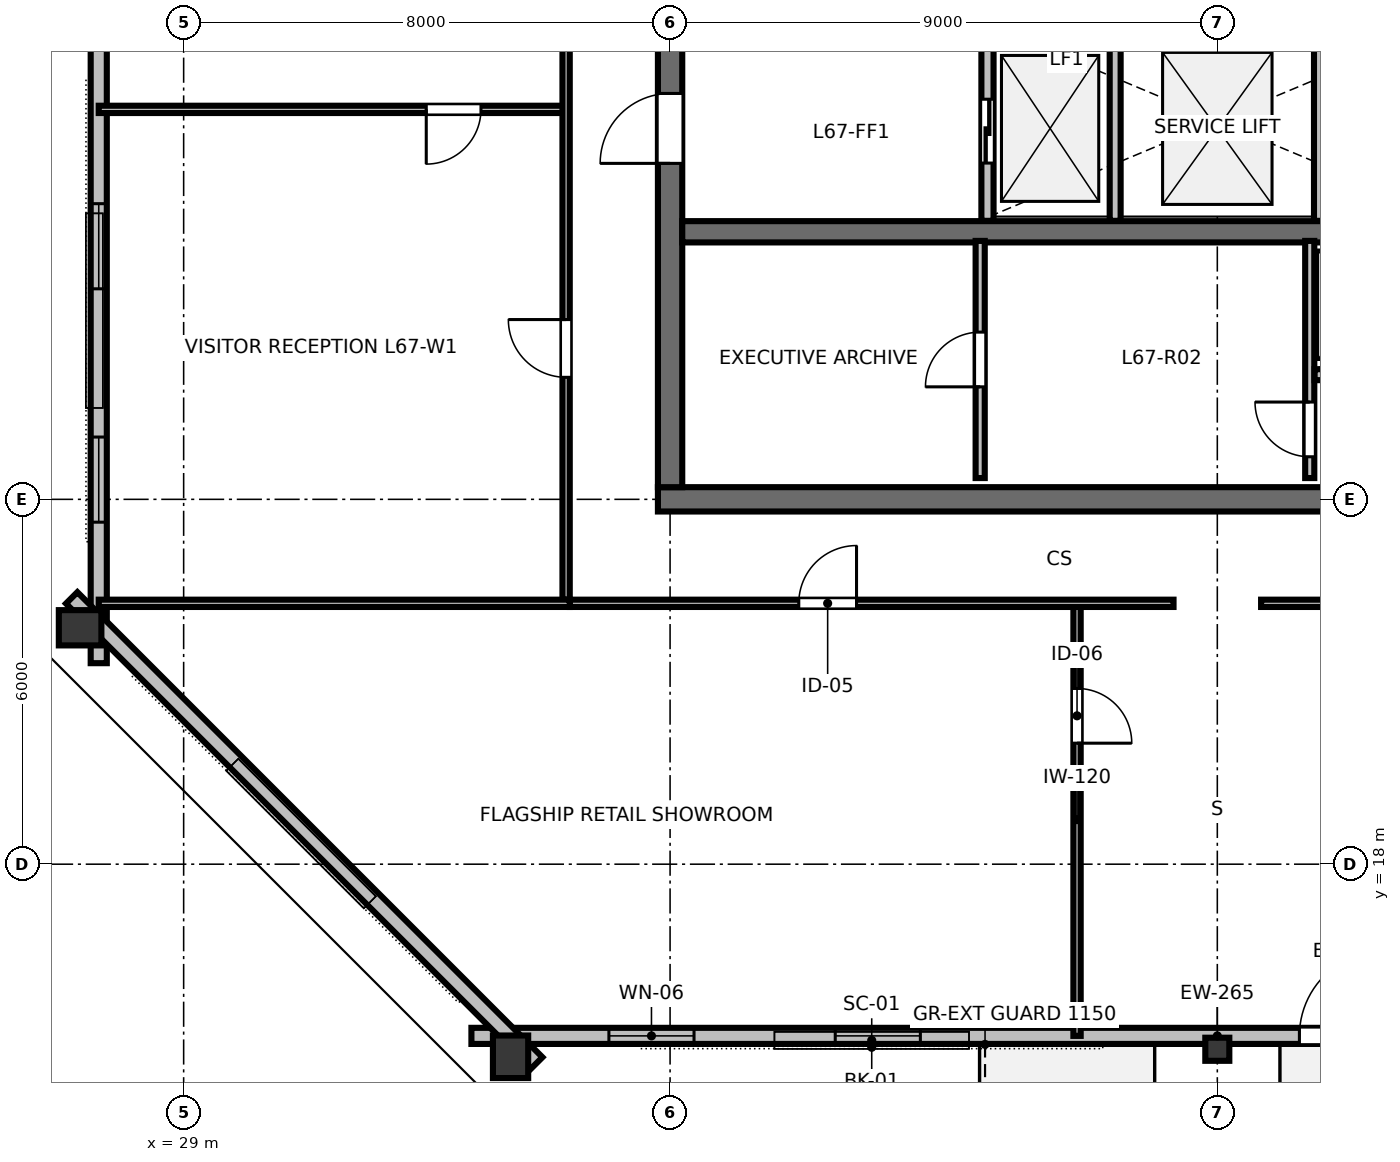
"""IFC4 building model, lengths in metres.
Left out: names, types, materials, properties, quantities, classifications, styles, units other than length and angle.
Written with IfcOpenShell. Run it as: python <this file> out.ifc"""

import sys

from ifc_helpers import new_model, si_unit, direction, frame, frame_2d, origin, origin_2d, place, context, subcontext, project, spatial, rectangle, hollow_rectangle, i_section, extrude, element, fill, save


model = new_model("IFC4")
c1 = context("Model", 3, precision=1e-05, world=origin(), true_north=direction((0.0, 1.0)))
c2 = subcontext(c1, "Body", "Model", "MODEL_VIEW")
j1 = project(units=[si_unit("LENGTHUNIT", "METRE"), si_unit("PLANEANGLEUNIT", "RADIAN")], contexts=[c1])
p1 = place(None, origin())
s1 = spatial("IfcSite", under=j1, at=p1, CompositionType="ELEMENT")
p2 = place(p1, origin())
s2 = spatial("IfcBuilding", under=s1, at=p2, CompositionType="ELEMENT")
p3 = place(p2, frame((0.0, 0.0, 253.8)))
s3 = spatial("IfcBuildingStorey", under=s2, at=p3, CompositionType="ELEMENT", Elevation=253.8)
p4 = place(p3, frame((36.8, 24.0, 0.0), z_axis=(0.0, 0.0, 1.0), x_axis=(1.0, 0.0, 0.0)))
e1 = element("IfcWall", 1, at=p4, inside=s3, PredefinedType="SHEAR", context=c2, shape_type="SweptSolid", body=[
    extrude(rectangle(XDim=18.4, YDim=0.4, at=frame_2d((9.2, 0.0))), origin(), (0.0, 0.0, 1.0), 3.36),
])
p5 = place(p4, frame((13.4, 0.0, 0.0)))
e2 = element("IfcOpeningElement", 2, at=p5, cuts=e1, PredefinedType="OPENING", context=c2, shape_type="SweptSolid", body=[
    extrude(rectangle(XDim=1.6, YDim=2.15, at=frame_2d((0.8, 1.075))), frame((0.0, 0.21, 0.0), z_axis=(0.0, -1.0, 0.0), x_axis=(1.0, 0.0, 0.0)), (0.0, 0.0, 1.0), 0.42),
])
p6 = place(p3, frame((37.0, 24.2, 0.0), z_axis=(0.0, 0.0, 1.0), x_axis=(0.0, 1.0, 0.0)))
e3 = element("IfcWall", 3, at=p6, inside=s3, PredefinedType="SHEAR", context=c2, shape_type="SweptSolid", body=[
    extrude(rectangle(XDim=15.6, YDim=0.4, at=frame_2d((7.8, 0.0))), origin(), (0.0, 0.0, 1.0), 3.36),
])
p7 = place(p6, frame((5.325, 0.0, 0.0)))
e4 = element("IfcOpeningElement", 4, at=p7, cuts=e3, PredefinedType="OPENING", context=c2, shape_type="SweptSolid", body=[
    extrude(rectangle(XDim=1.15, YDim=2.15, at=frame_2d((0.575, 1.075))), frame((0.0, 0.21, 0.0), z_axis=(0.0, -1.0, 0.0), x_axis=(1.0, 0.0, 0.0)), (0.0, 0.0, 1.0), 0.42),
])
p8 = place(p3, frame((37.2, 28.4, 0.0), z_axis=(0.0, 0.0, 1.0), x_axis=(1.0, 0.0, 0.0)))
e5 = element("IfcWall", 5, at=p8, inside=s3, PredefinedType="SHEAR", context=c2, shape_type="SweptSolid", body=[
    extrude(rectangle(XDim=17.6, YDim=0.35, at=frame_2d((8.8, 0.0))), origin(), (0.0, 0.0, 1.0), 3.36),
])
p9 = place(p3, frame((34.376, 14.833, 0.0), z_axis=(0.0, 0.0, 1.0), x_axis=(1.0, 0.0, 0.0)))
e6 = element("IfcColumn", 6, at=p9, inside=s3, PredefinedType="COLUMN", context=c2, shape_type="SweptSolid", body=[
    extrude(hollow_rectangle(XDim=0.58, YDim=0.7, WallThickness=0.032, at=origin_2d()), origin(), (0.0, 0.0, 1.0), 3.373),
])
p10 = place(p3, frame((46.0, 14.956, 0.0), z_axis=(0.0, 0.0, 1.0), x_axis=(1.0, 0.0, 0.0)))
e7 = element("IfcColumn", 7, at=p10, inside=s3, PredefinedType="COLUMN", context=c2, shape_type="SweptSolid", body=[
    extrude(i_section(OverallWidth=0.395, OverallDepth=0.38, WebThickness=0.019, FlangeThickness=0.03, FilletRadius=0.025, at=origin_2d()), origin(), (0.0, 0.0, 1.0), 3.373),
])
p11 = place(p3, frame((27.297, 21.888, 0.0), z_axis=(0.0, 0.0, 1.0), x_axis=(0.0, 1.0, 0.0)))
e8 = element("IfcColumn", 8, at=p11, inside=s3, PredefinedType="COLUMN", context=c2, shape_type="SweptSolid", body=[
    extrude(hollow_rectangle(XDim=0.58, YDim=0.7, WallThickness=0.032, at=origin_2d()), origin(), (0.0, 0.0, 1.0), 3.373),
])
p12 = place(p3, frame((33.733, 15.177, 0.0), z_axis=(0.0, 0.0, 1.0), x_axis=(1.0, 0.0, 0.0)))
e9 = element("IfcWall", 9, at=p12, inside=s3, PredefinedType="STANDARD", context=c2, shape_type="SweptSolid", body=[
    extrude(rectangle(XDim=24.535, YDim=0.265, at=frame_2d((12.267, 0.0))), origin(), (0.0, 0.0, 1.0), 2.832),
])
p13 = place(p12, frame((13.617, 0.0, 0.0)))
e10 = element("IfcOpeningElement", 10, at=p13, cuts=e9, PredefinedType="OPENING", context=c2, shape_type="SweptSolid", body=[
    extrude(rectangle(XDim=1.4, YDim=2.15, at=frame_2d((0.7, 1.075))), frame((0.0, 0.142, 0.0), z_axis=(0.0, -1.0, 0.0), x_axis=(1.0, 0.0, 0.0)), (0.0, 0.0, 1.0), 0.285),
])
p14 = place(p12, frame((2.261, 0.0, 0.85)))
e11 = element("IfcOpeningElement", 11, at=p14, cuts=e9, PredefinedType="OPENING", context=c2, shape_type="SweptSolid", body=[
    extrude(rectangle(XDim=1.4, YDim=1.2, at=frame_2d((0.7, 0.6))), frame((0.0, 0.142, 0.0), z_axis=(0.0, -1.0, 0.0), x_axis=(1.0, 0.0, 0.0)), (0.0, 0.0, 1.0), 0.285),
])
p15 = place(p12, frame((5.984, 0.0, 0.85)))
e12 = element("IfcOpeningElement", 12, at=p15, cuts=e9, PredefinedType="OPENING", context=c2, shape_type="SweptSolid", body=[
    extrude(rectangle(XDim=1.4, YDim=1.2, at=frame_2d((0.7, 0.6))), frame((0.0, 0.142, 0.0), z_axis=(0.0, -1.0, 0.0), x_axis=(1.0, 0.0, 0.0)), (0.0, 0.0, 1.0), 0.285),
])
p16 = place(p12, frame((17.151, 0.0, 0.85)))
e13 = element("IfcOpeningElement", 13, at=p16, cuts=e9, PredefinedType="OPENING", context=c2, shape_type="SweptSolid", body=[
    extrude(rectangle(XDim=1.4, YDim=1.2, at=frame_2d((0.7, 0.6))), frame((0.0, 0.142, 0.0), z_axis=(0.0, -1.0, 0.0), x_axis=(1.0, 0.0, 0.0)), (0.0, 0.0, 1.0), 0.285),
])
p17 = place(p12, frame((20.873, 0.0, 0.85)))
e14 = element("IfcOpeningElement", 14, at=p17, cuts=e9, PredefinedType="OPENING", context=c2, shape_type="SweptSolid", body=[
    extrude(rectangle(XDim=1.4, YDim=1.2, at=frame_2d((0.7, 0.6))), frame((0.0, 0.142, 0.0), z_axis=(0.0, -1.0, 0.0), x_axis=(1.0, 0.0, 0.0)), (0.0, 0.0, 1.0), 0.285),
])
p18 = place(p3, frame((27.604, 42.695, 0.0), z_axis=(0.0, 0.0, 1.0), x_axis=(0.0, -1.0, 0.0)))
e15 = element("IfcWall", 15, at=p18, inside=s3, PredefinedType="STANDARD", context=c2, shape_type="SweptSolid", body=[
    extrude(rectangle(XDim=21.389, YDim=0.265, at=frame_2d((10.695, 0.0))), origin(), (0.0, 0.0, 1.0), 2.832),
])
p19 = place(p18, frame((2.319, 0.0, 0.85)))
e16 = element("IfcOpeningElement", 16, at=p19, cuts=e15, PredefinedType="OPENING", context=c2, shape_type="SweptSolid", body=[
    extrude(rectangle(XDim=1.4, YDim=1.2, at=frame_2d((0.7, 0.6))), frame((0.0, 0.142, 0.0), z_axis=(0.0, -1.0, 0.0), x_axis=(1.0, 0.0, 0.0)), (0.0, 0.0, 1.0), 0.285),
])
p20 = place(p18, frame((6.157, 0.0, 0.85)))
e17 = element("IfcOpeningElement", 17, at=p20, cuts=e15, PredefinedType="OPENING", context=c2, shape_type="SweptSolid", body=[
    extrude(rectangle(XDim=1.4, YDim=1.2, at=frame_2d((0.7, 0.6))), frame((0.0, 0.142, 0.0), z_axis=(0.0, -1.0, 0.0), x_axis=(1.0, 0.0, 0.0)), (0.0, 0.0, 1.0), 0.285),
])
p21 = place(p18, frame((13.832, 0.0, 0.85)))
e18 = element("IfcOpeningElement", 18, at=p21, cuts=e15, PredefinedType="OPENING", context=c2, shape_type="SweptSolid", body=[
    extrude(rectangle(XDim=1.4, YDim=1.2, at=frame_2d((0.7, 0.6))), frame((0.0, 0.142, 0.0), z_axis=(0.0, -1.0, 0.0), x_axis=(1.0, 0.0, 0.0)), (0.0, 0.0, 1.0), 0.285),
])
p22 = place(p18, frame((17.67, 0.0, 0.85)))
e19 = element("IfcOpeningElement", 19, at=p22, cuts=e15, PredefinedType="OPENING", context=c2, shape_type="SweptSolid", body=[
    extrude(rectangle(XDim=1.4, YDim=1.2, at=frame_2d((0.7, 0.6))), frame((0.0, 0.142, 0.0), z_axis=(0.0, -1.0, 0.0), x_axis=(1.0, 0.0, 0.0)), (0.0, 0.0, 1.0), 0.285),
])
p23 = place(p3, frame((27.159, 22.38, 0.0), z_axis=(0.0, 0.0, 1.0), x_axis=(0.707106781187, -0.707106781187, 0.0)))
e20 = element("IfcWall", 20, at=p23, inside=s3, PredefinedType="STANDARD", context=c2, shape_type="SweptSolid", body=[
    extrude(rectangle(XDim=10.816, YDim=0.265, at=frame_2d((5.408, 0.0))), origin(), (0.0, 0.0, 1.0), 2.832),
])
p24 = place(p3, frame((42.22, 28.58, 0.0), z_axis=(0.0, 0.0, 1.0), x_axis=(0.0, 1.0, 0.0)))
e21 = element("IfcWall", 21, at=p24, inside=s3, PredefinedType="PARTITIONING", context=c2, shape_type="SweptSolid", body=[
    extrude(rectangle(XDim=3.04, YDim=0.2, at=frame_2d((1.52, 0.0))), origin(), (0.0, 0.0, 1.0), 3.375),
])
p25 = place(p24, frame((0.95, 0.0, 0.0)))
e22 = element("IfcOpeningElement", 22, at=p25, cuts=e21, PredefinedType="OPENING", context=c2, shape_type="SweptSolid", body=[
    extrude(rectangle(XDim=1.05, YDim=2.15, at=frame_2d((0.525, 1.075))), frame((0.0, 0.11, 0.0), z_axis=(0.0, -1.0, 0.0), x_axis=(1.0, 0.0, 0.0)), (0.0, 0.0, 1.0), 0.22),
])
for number, where, z_axis, x_axis in (
    (23, (44.32, 28.58, 0.0), (0.0, 0.0, 1.0), (0.0, 1.0, 0.0)),
    (24, (47.68, 28.58, 0.0), (0.0, 0.0, 1.0), (0.0, 1.0, 0.0)),
):
    element("IfcWall", number, at=place(p3, frame(where, z_axis=z_axis, x_axis=x_axis)), inside=s3, PredefinedType="PARTITIONING", context=c2, shape_type="SweptSolid", body=[
        extrude(rectangle(XDim=3.04, YDim=0.18, at=frame_2d((1.52, 0.0))), origin(), (0.0, 0.0, 1.0), 3.375),
    ])
p26 = place(p3, frame((42.1, 24.35, 0.0), z_axis=(0.0, 0.0, 1.0), x_axis=(0.0, 1.0, 0.0)))
e25 = element("IfcWall", 25, at=p26, inside=s3, PredefinedType="PARTITIONING", context=c2, shape_type="SweptSolid", body=[
    extrude(rectangle(XDim=3.9, YDim=0.15, at=frame_2d((1.95, 0.0))), origin(), (0.0, 0.0, 1.0), 3.375),
])
p27 = place(p26, frame((1.5, 0.0, 0.0)))
e26 = element("IfcOpeningElement", 26, at=p27, cuts=e25, PredefinedType="OPENING", context=c2, shape_type="SweptSolid", body=[
    extrude(rectangle(XDim=0.9, YDim=2.15, at=frame_2d((0.45, 1.075))), frame((0.0, 0.085, 0.0), z_axis=(0.0, -1.0, 0.0), x_axis=(1.0, 0.0, 0.0)), (0.0, 0.0, 1.0), 0.17),
])
p28 = place(p3, frame((47.52, 24.35, 0.0), z_axis=(0.0, 0.0, 1.0), x_axis=(0.0, 1.0, 0.0)))
e27 = element("IfcWall", 27, at=p28, inside=s3, PredefinedType="PARTITIONING", context=c2, shape_type="SweptSolid", body=[
    extrude(rectangle(XDim=3.9, YDim=0.15, at=frame_2d((1.95, 0.0))), origin(), (0.0, 0.0, 1.0), 3.375),
])
p29 = place(p28, frame((0.35, 0.0, 0.0)))
e28 = element("IfcOpeningElement", 28, at=p29, cuts=e27, PredefinedType="OPENING", context=c2, shape_type="SweptSolid", body=[
    extrude(rectangle(XDim=0.9, YDim=2.15, at=frame_2d((0.45, 1.075))), frame((0.0, 0.085, 0.0), z_axis=(0.0, -1.0, 0.0), x_axis=(1.0, 0.0, 0.0)), (0.0, 0.0, 1.0), 0.17),
])
p30 = place(p3, frame((47.6, 26.05, 0.0), z_axis=(0.0, 0.0, 1.0), x_axis=(1.0, 0.0, 0.0)))
e29 = element("IfcWall", 29, at=p30, inside=s3, PredefinedType="PARTITIONING", context=c2, shape_type="SweptSolid", body=[
    extrude(rectangle(XDim=7.0, YDim=0.18, at=frame_2d((3.5, 0.0))), origin(), (0.0, 0.0, 1.0), 3.375),
])
p31 = place(p30, frame((1.2, 0.0, 0.0)))
e30 = element("IfcOpeningElement", 30, at=p31, cuts=e29, PredefinedType="OPENING", context=c2, shape_type="SweptSolid", body=[
    extrude(rectangle(XDim=1.05, YDim=2.15, at=frame_2d((0.525, 1.075))), frame((0.0, 0.1, 0.0), z_axis=(0.0, -1.0, 0.0), x_axis=(1.0, 0.0, 0.0)), (0.0, 0.0, 1.0), 0.2),
])
p32 = place(p30, frame((3.4, 0.0, 0.0)))
e31 = element("IfcOpeningElement", 31, at=p32, cuts=e29, PredefinedType="OPENING", context=c2, shape_type="SweptSolid", body=[
    extrude(rectangle(XDim=1.05, YDim=2.15, at=frame_2d((0.525, 1.075))), frame((0.0, 0.1, 0.0), z_axis=(0.0, -1.0, 0.0), x_axis=(1.0, 0.0, 0.0)), (0.0, 0.0, 1.0), 0.2),
])
p33 = place(p3, frame((43.693, 22.29, 0.0), z_axis=(0.0, 0.0, 1.0), x_axis=(0.0, -1.0, 0.0)))
e32 = element("IfcWall", 32, at=p33, inside=s3, PredefinedType="PARTITIONING", context=c2, shape_type="SweptSolid", body=[
    extrude(rectangle(XDim=7.114, YDim=0.12, at=frame_2d((3.557, 0.0))), origin(), (0.0, 0.0, 1.0), 2.655),
])
p34 = place(p33, frame((1.4, 0.0, 0.0)))
e33 = element("IfcOpeningElement", 33, at=p34, cuts=e32, PredefinedType="OPENING", context=c2, shape_type="SweptSolid", body=[
    extrude(rectangle(XDim=0.9, YDim=2.15, at=frame_2d((0.45, 1.075))), frame((0.0, 0.07, 0.0), z_axis=(0.0, -1.0, 0.0), x_axis=(1.0, 0.0, 0.0)), (0.0, 0.0, 1.0), 0.14),
])
p35 = place(p3, frame((35.35, 22.29, 0.0), z_axis=(0.0, 0.0, 1.0), x_axis=(1.0, 0.0, 0.0)))
e34 = element("IfcWall", 34, at=p35, inside=s3, PredefinedType="PARTITIONING", context=c2, shape_type="SweptSolid", body=[
    extrude(rectangle(XDim=9.93, YDim=0.12, at=frame_2d((4.965, 0.0))), origin(), (0.0, 0.0, 1.0), 2.655),
])
p36 = place(p35, frame((3.767, 0.0, 0.0)))
e35 = element("IfcOpeningElement", 35, at=p36, cuts=e34, PredefinedType="OPENING", context=c2, shape_type="SweptSolid", body=[
    extrude(rectangle(XDim=0.95, YDim=2.15, at=frame_2d((0.475, 1.075))), frame((0.0, 0.07, 0.0), z_axis=(0.0, -1.0, 0.0), x_axis=(1.0, 0.0, 0.0)), (0.0, 0.0, 1.0), 0.14),
])
p37 = place(p3, frame((46.72, 22.29, 0.0), z_axis=(0.0, 0.0, 1.0), x_axis=(1.0, 0.0, 0.0)))
e36 = element("IfcWall", 36, at=p37, inside=s3, PredefinedType="PARTITIONING", context=c2, shape_type="SweptSolid", body=[
    extrude(rectangle(XDim=9.93, YDim=0.12, at=frame_2d((4.965, 0.0))), origin(), (0.0, 0.0, 1.0), 2.655),
])
p38 = place(p37, frame((4.555, 0.0, 0.0)))
e37 = element("IfcOpeningElement", 37, at=p38, cuts=e36, PredefinedType="OPENING", context=c2, shape_type="SweptSolid", body=[
    extrude(rectangle(XDim=0.95, YDim=2.15, at=frame_2d((0.475, 1.075))), frame((0.0, 0.07, 0.0), z_axis=(0.0, -1.0, 0.0), x_axis=(1.0, 0.0, 0.0)), (0.0, 0.0, 1.0), 0.14),
])
p39 = place(p3, frame((35.29, 30.413, 0.0), z_axis=(0.0, 0.0, 1.0), x_axis=(-1.0, 0.0, 0.0)))
e38 = element("IfcWall", 38, at=p39, inside=s3, PredefinedType="PARTITIONING", context=c2, shape_type="SweptSolid", body=[
    extrude(rectangle(XDim=7.687, YDim=0.12, at=frame_2d((3.843, 0.0))), origin(), (0.0, 0.0, 1.0), 2.655),
])
p40 = place(p39, frame((1.4, 0.0, 0.0)))
e39 = element("IfcOpeningElement", 39, at=p40, cuts=e38, PredefinedType="OPENING", context=c2, shape_type="SweptSolid", body=[
    extrude(rectangle(XDim=0.9, YDim=2.15, at=frame_2d((0.45, 1.075))), frame((0.0, 0.07, 0.0), z_axis=(0.0, -1.0, 0.0), x_axis=(1.0, 0.0, 0.0)), (0.0, 0.0, 1.0), 0.14),
])
p41 = place(p3, frame((35.29, 22.35, 0.0), z_axis=(0.0, 0.0, 1.0), x_axis=(0.0, 1.0, 0.0)))
e40 = element("IfcWall", 40, at=p41, inside=s3, PredefinedType="PARTITIONING", context=c2, shape_type="SweptSolid", body=[
    extrude(rectangle(XDim=19.3, YDim=0.12, at=frame_2d((9.65, 0.0))), origin(), (0.0, 0.0, 1.0), 2.655),
])
p42 = place(p41, frame((3.656, 0.0, 0.0)))
e41 = element("IfcOpeningElement", 41, at=p42, cuts=e40, PredefinedType="OPENING", context=c2, shape_type="SweptSolid", body=[
    extrude(rectangle(XDim=0.95, YDim=2.15, at=frame_2d((0.475, 1.075))), frame((0.0, 0.07, 0.0), z_axis=(0.0, -1.0, 0.0), x_axis=(1.0, 0.0, 0.0)), (0.0, 0.0, 1.0), 0.14),
])
p43 = place(p41, frame((13.106, 0.0, 0.0)))
e42 = element("IfcOpeningElement", 42, at=p43, cuts=e40, PredefinedType="OPENING", context=c2, shape_type="SweptSolid", body=[
    extrude(rectangle(XDim=0.95, YDim=2.15, at=frame_2d((0.475, 1.075))), frame((0.0, 0.07, 0.0), z_axis=(0.0, -1.0, 0.0), x_axis=(1.0, 0.0, 0.0)), (0.0, 0.0, 1.0), 0.14),
])
p44 = place(p3, frame((35.35, 22.29, 0.0), z_axis=(0.0, 0.0, 1.0), x_axis=(-1.0, 0.0, 0.0)))
e43 = element("IfcWall", 43, at=p44, inside=s3, PredefinedType="PARTITIONING", context=c2, shape_type="SweptSolid", body=[
    extrude(rectangle(XDim=7.747, YDim=0.12, at=frame_2d((3.873, 0.0))), origin(), (0.0, 0.0, 1.0), 2.655),
])
p45 = place(p13, origin())
e44 = element("IfcDoor", 44, at=p45, inside=s3, OperationType="SINGLE_SWING_RIGHT", PredefinedType="DOOR", context=c2, shape_type="SweptSolid", body=[
    extrude(rectangle(XDim=1.4, YDim=2.15, at=frame_2d((0.7, 1.075))), frame((0.0, 0.025, 0.0), z_axis=(0.0, -1.0, 0.0), x_axis=(1.0, 0.0, 0.0)), (0.0, 0.0, 1.0), 0.05),
])
fill(e10, e44)
p46 = place(p14, origin())
e45 = element("IfcWindow", 45, at=p46, inside=s3, PartitioningType="SINGLE_PANEL", PredefinedType="WINDOW", context=c2, shape_type="SweptSolid", body=[
    extrude(rectangle(XDim=1.4, YDim=1.2, at=frame_2d((0.7, 0.6))), frame((0.0, 0.03, 0.0), z_axis=(0.0, -1.0, 0.0), x_axis=(1.0, 0.0, 0.0)), (0.0, 0.0, 1.0), 0.06),
])
fill(e11, e45)
p47 = place(p15, origin())
e46 = element("IfcWindow", 46, at=p47, inside=s3, PartitioningType="SINGLE_PANEL", PredefinedType="WINDOW", context=c2, shape_type="SweptSolid", body=[
    extrude(rectangle(XDim=1.4, YDim=1.2, at=frame_2d((0.7, 0.6))), frame((0.0, 0.03, 0.0), z_axis=(0.0, -1.0, 0.0), x_axis=(1.0, 0.0, 0.0)), (0.0, 0.0, 1.0), 0.06),
])
fill(e12, e46)
p48 = place(p21, origin())
e47 = element("IfcWindow", 47, at=p48, inside=s3, PartitioningType="SINGLE_PANEL", PredefinedType="WINDOW", context=c2, shape_type="SweptSolid", body=[
    extrude(rectangle(XDim=1.4, YDim=1.2, at=frame_2d((0.7, 0.6))), frame((0.0, 0.03, 0.0), z_axis=(0.0, -1.0, 0.0), x_axis=(1.0, 0.0, 0.0)), (0.0, 0.0, 1.0), 0.06),
])
fill(e18, e47)
p49 = place(p22, origin())
e48 = element("IfcWindow", 48, at=p49, inside=s3, PartitioningType="SINGLE_PANEL", PredefinedType="WINDOW", context=c2, shape_type="SweptSolid", body=[
    extrude(rectangle(XDim=1.4, YDim=1.2, at=frame_2d((0.7, 0.6))), frame((0.0, 0.03, 0.0), z_axis=(0.0, -1.0, 0.0), x_axis=(1.0, 0.0, 0.0)), (0.0, 0.0, 1.0), 0.06),
])
fill(e19, e48)
p50 = place(p7, origin())
e49 = element("IfcDoor", 49, at=p50, inside=s3, OperationType="SINGLE_SWING_LEFT", PredefinedType="DOOR", context=c2, shape_type="SweptSolid", body=[
    extrude(rectangle(XDim=1.15, YDim=2.15, at=frame_2d((0.575, 1.075))), frame((0.0, 0.025, 0.0), z_axis=(0.0, -1.0, 0.0), x_axis=(1.0, 0.0, 0.0)), (0.0, 0.0, 1.0), 0.05),
])
fill(e4, e49)
p51 = place(p25, origin())
e50 = element("IfcDoor", 50, at=p51, inside=s3, OperationType="SLIDING_TO_LEFT", PredefinedType="DOOR", context=c2, shape_type="SweptSolid", body=[
    extrude(rectangle(XDim=1.05, YDim=2.15, at=frame_2d((0.525, 1.075))), frame((0.0, 0.025, 0.0), z_axis=(0.0, -1.0, 0.0), x_axis=(1.0, 0.0, 0.0)), (0.0, 0.0, 1.0), 0.05),
])
fill(e22, e50)
p52 = place(p27, origin())
e51 = element("IfcDoor", 51, at=p52, inside=s3, OperationType="SINGLE_SWING_LEFT", PredefinedType="DOOR", context=c2, shape_type="SweptSolid", body=[
    extrude(rectangle(XDim=0.9, YDim=2.15, at=frame_2d((0.45, 1.075))), frame((0.0, 0.025, 0.0), z_axis=(0.0, -1.0, 0.0), x_axis=(1.0, 0.0, 0.0)), (0.0, 0.0, 1.0), 0.05),
])
fill(e26, e51)
p53 = place(p29, origin())
e52 = element("IfcDoor", 52, at=p53, inside=s3, OperationType="SINGLE_SWING_RIGHT", PredefinedType="DOOR", context=c2, shape_type="SweptSolid", body=[
    extrude(rectangle(XDim=0.9, YDim=2.15, at=frame_2d((0.45, 1.075))), frame((0.0, 0.025, 0.0), z_axis=(0.0, -1.0, 0.0), x_axis=(1.0, 0.0, 0.0)), (0.0, 0.0, 1.0), 0.05),
])
fill(e28, e52)
p54 = place(p34, origin())
e53 = element("IfcDoor", 53, at=p54, inside=s3, OperationType="SINGLE_SWING_RIGHT", PredefinedType="DOOR", context=c2, shape_type="SweptSolid", body=[
    extrude(rectangle(XDim=0.9, YDim=2.15, at=frame_2d((0.45, 1.075))), frame((0.0, 0.025, 0.0), z_axis=(0.0, -1.0, 0.0), x_axis=(1.0, 0.0, 0.0)), (0.0, 0.0, 1.0), 0.05),
])
fill(e33, e53)
p55 = place(p36, origin())
e54 = element("IfcDoor", 54, at=p55, inside=s3, OperationType="SINGLE_SWING_RIGHT", PredefinedType="DOOR", context=c2, shape_type="SweptSolid", body=[
    extrude(rectangle(XDim=0.95, YDim=2.15, at=frame_2d((0.475, 1.075))), frame((0.0, 0.025, 0.0), z_axis=(0.0, -1.0, 0.0), x_axis=(1.0, 0.0, 0.0)), (0.0, 0.0, 1.0), 0.05),
])
fill(e35, e54)
p56 = place(p40, origin())
e55 = element("IfcDoor", 55, at=p56, inside=s3, OperationType="SINGLE_SWING_RIGHT", PredefinedType="DOOR", context=c2, shape_type="SweptSolid", body=[
    extrude(rectangle(XDim=0.9, YDim=2.15, at=frame_2d((0.45, 1.075))), frame((0.0, 0.025, 0.0), z_axis=(0.0, -1.0, 0.0), x_axis=(1.0, 0.0, 0.0)), (0.0, 0.0, 1.0), 0.05),
])
fill(e39, e55)
p57 = place(p42, origin())
e56 = element("IfcDoor", 56, at=p57, inside=s3, OperationType="SINGLE_SWING_RIGHT", PredefinedType="DOOR", context=c2, shape_type="SweptSolid", body=[
    extrude(rectangle(XDim=0.95, YDim=2.15, at=frame_2d((0.475, 1.075))), frame((0.0, 0.025, 0.0), z_axis=(0.0, -1.0, 0.0), x_axis=(1.0, 0.0, 0.0)), (0.0, 0.0, 1.0), 0.05),
])
fill(e41, e56)
save(model, sys.argv[1])
